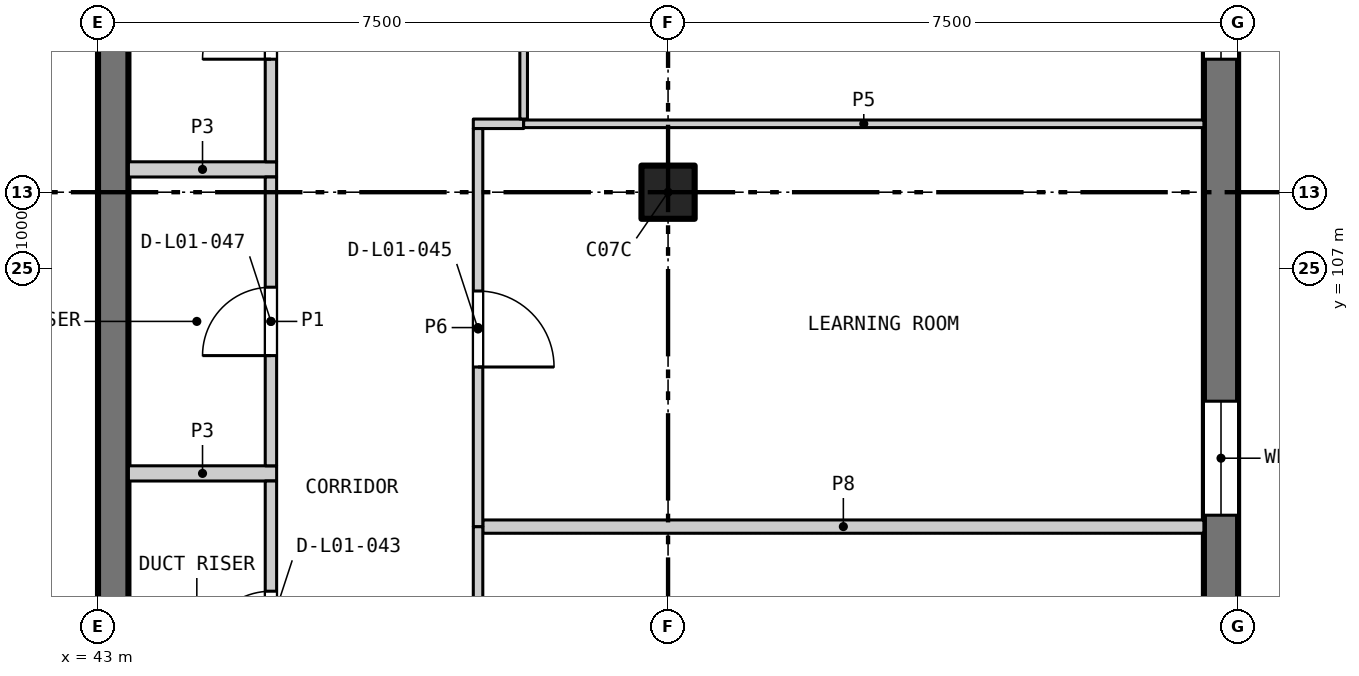
"""IFC4 building model, lengths in metres.
Left out: names, types, materials, properties, quantities, classifications, styles, units other than length and angle.
Written with IfcOpenShell. Run it as: python <this file> out.ifc"""

import sys

from ifc_helpers import new_model, si_unit, direction, frame, frame_2d, origin, origin_2d, place, context, subcontext, project, spatial, rectangle, extrude, element, fill, save


model = new_model("IFC4")
c1 = context("Model", 3, precision=1e-05, world=origin(), true_north=direction((0.0, 1.0)))
c2 = subcontext(c1, "Body", "Model", "MODEL_VIEW")
j1 = project(units=[si_unit("LENGTHUNIT", "METRE"), si_unit("PLANEANGLEUNIT", "RADIAN")], contexts=[c1])
p1 = place(None, origin())
s1 = spatial("IfcSite", under=j1, at=p1, CompositionType="ELEMENT")
p2 = place(p1, origin())
s2 = spatial("IfcBuilding", under=s1, at=p2, CompositionType="ELEMENT")
p3 = place(p2, frame((0.0, 0.0, 6.0)))
s3 = spatial("IfcBuildingStorey", under=s2, at=p3, CompositionType="ELEMENT", Elevation=6.0)
p4 = place(p3, frame((50.5, 108.0, 0.0), z_axis=(0.0, 0.0, 1.0), x_axis=(1.0, 0.0, 0.0)))
e1 = element("IfcColumn", 1, at=p4, inside=s3, PredefinedType="COLUMN", context=c2, shape_type="SweptSolid", body=[
    extrude(rectangle(XDim=0.7, YDim=0.7, at=origin_2d()), origin(), (0.0, 0.0, 1.0), 3.9),
])
p5 = place(p3, frame((43.2, 99.0, 0.0), z_axis=(0.0, 0.0, 1.0), x_axis=(0.0, 1.0, 0.0)))
e2 = element("IfcWall", 2, at=p5, inside=s3, PredefinedType="SHEAR", context=c2, shape_type="SweptSolid", body=[
    extrude(rectangle(XDim=26.55, YDim=0.4, at=frame_2d((13.275, 0.0))), origin(), (0.0, 0.0, 1.0), 4.2),
])
p6 = place(p5, frame((13.55, 0.0, 0.0)))
e3 = element("IfcOpeningElement", 3, at=p6, cuts=e2, PredefinedType="OPENING", context=c2, shape_type="SweptSolid", body=[
    extrude(rectangle(XDim=1.4, YDim=2.4, at=frame_2d((0.7, 1.2))), frame((0.0, 0.21, 0.0), z_axis=(0.0, -1.0, 0.0), x_axis=(1.0, 0.0, 0.0)), (0.0, 0.0, 1.0), 0.42),
])
p7 = place(p3, frame((57.775, 126.0, 0.0), z_axis=(0.0, 0.0, 1.0), x_axis=(0.0, -1.0, 0.0)))
e4 = element("IfcWall", 4, at=p7, inside=s3, PredefinedType="SOLIDWALL", context=c2, shape_type="SweptSolid", body=[
    extrude(rectangle(XDim=27.0, YDim=0.45, at=frame_2d((13.5, 0.0))), origin(), (0.0, 0.0, 1.0), 3.9),
])
p8 = place(p7, frame((20.75, 0.0, 0.8)))
e5 = element("IfcOpeningElement", 5, at=p8, cuts=e4, PredefinedType="OPENING", context=c2, shape_type="SweptSolid", body=[
    extrude(rectangle(XDim=1.5, YDim=2.2, at=frame_2d((0.75, 1.1))), frame((0.0, 0.235, 0.0), z_axis=(0.0, -1.0, 0.0), x_axis=(1.0, 0.0, 0.0)), (0.0, 0.0, 1.0), 0.47),
])
p9 = place(p7, frame((14.75, 0.0, 0.8)))
e6 = element("IfcOpeningElement", 6, at=p9, cuts=e4, PredefinedType="OPENING", context=c2, shape_type="SweptSolid", body=[
    extrude(rectangle(XDim=1.5, YDim=2.2, at=frame_2d((0.75, 1.1))), frame((0.0, 0.235, 0.0), z_axis=(0.0, -1.0, 0.0), x_axis=(1.0, 0.0, 0.0)), (0.0, 0.0, 1.0), 0.47),
])
for number, where, z_axis, x_axis in (
    (7, (43.4, 104.3, 0.0), (0.0, 0.0, 1.0), (1.0, 0.0, 0.0)),
    (8, (43.4, 108.3, 0.0), (0.0, 0.0, 1.0), (1.0, 0.0, 0.0)),
):
    element("IfcWall", number, at=place(p3, frame(where, z_axis=z_axis, x_axis=x_axis)), inside=s3, PredefinedType="PARTITIONING", context=c2, shape_type="SweptSolid", body=[
        extrude(rectangle(XDim=1.95, YDim=0.2, at=frame_2d((0.975, 0.0))), origin(), (0.0, 0.0, 1.0), 3.9),
    ])
p10 = place(p3, frame((45.275, 100.4, 0.0), z_axis=(0.0, 0.0, 1.0), x_axis=(0.0, 1.0, 0.0)))
e9 = element("IfcWall", 9, at=p10, inside=s3, PredefinedType="PARTITIONING", context=c2, shape_type="SweptSolid", body=[
    extrude(rectangle(XDim=3.8, YDim=0.15, at=frame_2d((1.9, 0.0))), origin(), (0.0, 0.0, 1.0), 3.9),
])
p11 = place(p10, frame((1.45, 0.0, 0.0)))
e10 = element("IfcOpeningElement", 10, at=p11, cuts=e9, PredefinedType="OPENING", context=c2, shape_type="SweptSolid", body=[
    extrude(rectangle(XDim=0.9, YDim=2.1, at=frame_2d((0.45, 1.05))), frame((0.0, 0.085, 0.0), z_axis=(0.0, -1.0, 0.0), x_axis=(1.0, 0.0, 0.0)), (0.0, 0.0, 1.0), 0.17),
])
p12 = place(p3, frame((45.275, 104.4, 0.0), z_axis=(0.0, 0.0, 1.0), x_axis=(0.0, 1.0, 0.0)))
e11 = element("IfcWall", 11, at=p12, inside=s3, PredefinedType="PARTITIONING", context=c2, shape_type="SweptSolid", body=[
    extrude(rectangle(XDim=3.8, YDim=0.15, at=frame_2d((1.9, 0.0))), origin(), (0.0, 0.0, 1.0), 3.9),
])
p13 = place(p12, frame((1.45, 0.0, 0.0)))
e12 = element("IfcOpeningElement", 12, at=p13, cuts=e11, PredefinedType="OPENING", context=c2, shape_type="SweptSolid", body=[
    extrude(rectangle(XDim=0.9, YDim=2.1, at=frame_2d((0.45, 1.05))), frame((0.0, 0.085, 0.0), z_axis=(0.0, -1.0, 0.0), x_axis=(1.0, 0.0, 0.0)), (0.0, 0.0, 1.0), 0.17),
])
p14 = place(p3, frame((45.275, 108.4, 0.0), z_axis=(0.0, 0.0, 1.0), x_axis=(0.0, 1.0, 0.0)))
e13 = element("IfcWall", 13, at=p14, inside=s3, PredefinedType="PARTITIONING", context=c2, shape_type="SweptSolid", body=[
    extrude(rectangle(XDim=3.6, YDim=0.15, at=frame_2d((1.8, 0.0))), origin(), (0.0, 0.0, 1.0), 3.9),
])
p15 = place(p14, frame((1.35, 0.0, 0.0)))
e14 = element("IfcOpeningElement", 14, at=p15, cuts=e13, PredefinedType="OPENING", context=c2, shape_type="SweptSolid", body=[
    extrude(rectangle(XDim=0.9, YDim=2.1, at=frame_2d((0.45, 1.05))), frame((0.0, 0.085, 0.0), z_axis=(0.0, -1.0, 0.0), x_axis=(1.0, 0.0, 0.0)), (0.0, 0.0, 1.0), 0.17),
])
p16 = place(p3, frame((48.062, 103.6, 0.0), z_axis=(0.0, 0.0, 1.0), x_axis=(1.0, 0.0, 0.0)))
e15 = element("IfcWall", 15, at=p16, inside=s3, PredefinedType="PARTITIONING", context=c2, shape_type="SweptSolid", body=[
    extrude(rectangle(XDim=9.488, YDim=0.175, at=frame_2d((4.744, 0.0))), origin(), (0.0, 0.0, 1.0), 3.9),
])
p17 = place(p3, frame((47.938, 108.9, 0.0), z_axis=(0.0, 0.0, 1.0), x_axis=(1.0, 0.0, 0.0)))
e16 = element("IfcWall", 16, at=p17, inside=s3, PredefinedType="PARTITIONING", context=c2, shape_type="SweptSolid", body=[
    extrude(rectangle(XDim=0.663, YDim=0.125, at=frame_2d((0.331, 0.0))), origin(), (0.0, 0.0, 1.0), 3.9),
])
p18 = place(p3, frame((48.6, 108.9, 0.0), z_axis=(0.0, 0.0, 1.0), x_axis=(1.0, 0.0, 0.0)))
e17 = element("IfcWall", 17, at=p18, inside=s3, PredefinedType="PARTITIONING", context=c2, shape_type="SweptSolid", body=[
    extrude(rectangle(XDim=8.95, YDim=0.1, at=frame_2d((4.475, 0.0))), origin(), (0.0, 0.0, 1.0), 3.9),
])
p19 = place(p3, frame((48.0, 99.538, 0.0), z_axis=(0.0, 0.0, 1.0), x_axis=(0.0, 1.0, 0.0)))
e18 = element("IfcWall", 18, at=p19, inside=s3, PredefinedType="PARTITIONING", context=c2, shape_type="SweptSolid", body=[
    extrude(rectangle(XDim=4.062, YDim=0.125, at=frame_2d((2.031, 0.0))), origin(), (0.0, 0.0, 1.0), 3.9),
])
p20 = place(p19, frame((1.55, 0.0, 0.0)))
e19 = element("IfcOpeningElement", 19, at=p20, cuts=e18, PredefinedType="OPENING", context=c2, shape_type="SweptSolid", body=[
    extrude(rectangle(XDim=1.0, YDim=2.1, at=frame_2d((0.5, 1.05))), frame((0.0, 0.073, 0.0), z_axis=(0.0, -1.0, 0.0), x_axis=(1.0, 0.0, 0.0)), (0.0, 0.0, 1.0), 0.145),
])
p21 = place(p3, frame((48.0, 103.6, 0.0), z_axis=(0.0, 0.0, 1.0), x_axis=(0.0, 1.0, 0.0)))
e20 = element("IfcWall", 20, at=p21, inside=s3, PredefinedType="PARTITIONING", context=c2, shape_type="SweptSolid", body=[
    extrude(rectangle(XDim=5.237, YDim=0.125, at=frame_2d((2.619, 0.0))), origin(), (0.0, 0.0, 1.0), 3.9),
])
p22 = place(p21, frame((2.1, 0.0, 0.0)))
e21 = element("IfcOpeningElement", 21, at=p22, cuts=e20, PredefinedType="OPENING", context=c2, shape_type="SweptSolid", body=[
    extrude(rectangle(XDim=1.0, YDim=2.1, at=frame_2d((0.5, 1.05))), frame((0.0, 0.073, 0.0), z_axis=(0.0, -1.0, 0.0), x_axis=(1.0, 0.0, 0.0)), (0.0, 0.0, 1.0), 0.145),
])
p23 = place(p3, frame((48.6, 108.962, 0.0), z_axis=(0.0, 0.0, 1.0), x_axis=(0.0, 1.0, 0.0)))
e22 = element("IfcWall", 22, at=p23, inside=s3, PredefinedType="PARTITIONING", context=c2, shape_type="SweptSolid", body=[
    extrude(rectangle(XDim=3.328, YDim=0.1, at=frame_2d((1.664, 0.0))), origin(), (0.0, 0.0, 1.0), 3.9),
])
p24 = place(p8, origin())
e23 = element("IfcWindow", 23, at=p24, inside=s3, PartitioningType="SINGLE_PANEL", PredefinedType="WINDOW", context=c2, shape_type="SweptSolid", body=[
    extrude(rectangle(XDim=1.5, YDim=2.2, at=frame_2d((0.75, 1.1))), frame((0.0, -0.075, 0.0), z_axis=(0.0, -1.0, 0.0), x_axis=(1.0, 0.0, 0.0)), (0.0, 0.0, 1.0), 0.06),
])
fill(e5, e23)
p25 = place(p9, origin())
e24 = element("IfcWindow", 24, at=p25, inside=s3, PartitioningType="SINGLE_PANEL", PredefinedType="WINDOW", context=c2, shape_type="SweptSolid", body=[
    extrude(rectangle(XDim=1.5, YDim=2.2, at=frame_2d((0.75, 1.1))), frame((0.0, -0.075, 0.0), z_axis=(0.0, -1.0, 0.0), x_axis=(1.0, 0.0, 0.0)), (0.0, 0.0, 1.0), 0.06),
])
fill(e6, e24)
p26 = place(p11, origin())
e25 = element("IfcDoor", 25, at=p26, inside=s3, OperationType="SINGLE_SWING_LEFT", PredefinedType="DOOR", context=c2, shape_type="SweptSolid", body=[
    extrude(rectangle(XDim=0.9, YDim=2.1, at=frame_2d((0.45, 1.05))), frame((0.0, 0.025, 0.0), z_axis=(0.0, -1.0, 0.0), x_axis=(1.0, 0.0, 0.0)), (0.0, 0.0, 1.0), 0.05),
])
fill(e10, e25)
p27 = place(p22, frame((1.0, 0.0, 0.0), z_axis=(0.0, 0.0, 1.0), x_axis=(-1.0, 0.0, 0.0)))
e26 = element("IfcDoor", 26, at=p27, inside=s3, OperationType="SINGLE_SWING_RIGHT", PredefinedType="DOOR", context=c2, shape_type="SweptSolid", body=[
    extrude(rectangle(XDim=1.0, YDim=2.1, at=frame_2d((0.5, 1.05))), frame((0.0, 0.025, 0.0), z_axis=(0.0, -1.0, 0.0), x_axis=(1.0, 0.0, 0.0)), (0.0, 0.0, 1.0), 0.05),
])
fill(e21, e26)
p28 = place(p13, origin())
e27 = element("IfcDoor", 27, at=p28, inside=s3, OperationType="SINGLE_SWING_LEFT", PredefinedType="DOOR", context=c2, shape_type="SweptSolid", body=[
    extrude(rectangle(XDim=0.9, YDim=2.1, at=frame_2d((0.45, 1.05))), frame((0.0, 0.025, 0.0), z_axis=(0.0, -1.0, 0.0), x_axis=(1.0, 0.0, 0.0)), (0.0, 0.0, 1.0), 0.05),
])
fill(e12, e27)
p29 = place(p15, origin())
e28 = element("IfcDoor", 28, at=p29, inside=s3, OperationType="SINGLE_SWING_LEFT", PredefinedType="DOOR", context=c2, shape_type="SweptSolid", body=[
    extrude(rectangle(XDim=0.9, YDim=2.1, at=frame_2d((0.45, 1.05))), frame((0.0, 0.025, 0.0), z_axis=(0.0, -1.0, 0.0), x_axis=(1.0, 0.0, 0.0)), (0.0, 0.0, 1.0), 0.05),
])
fill(e14, e28)
save(model, sys.argv[1])
